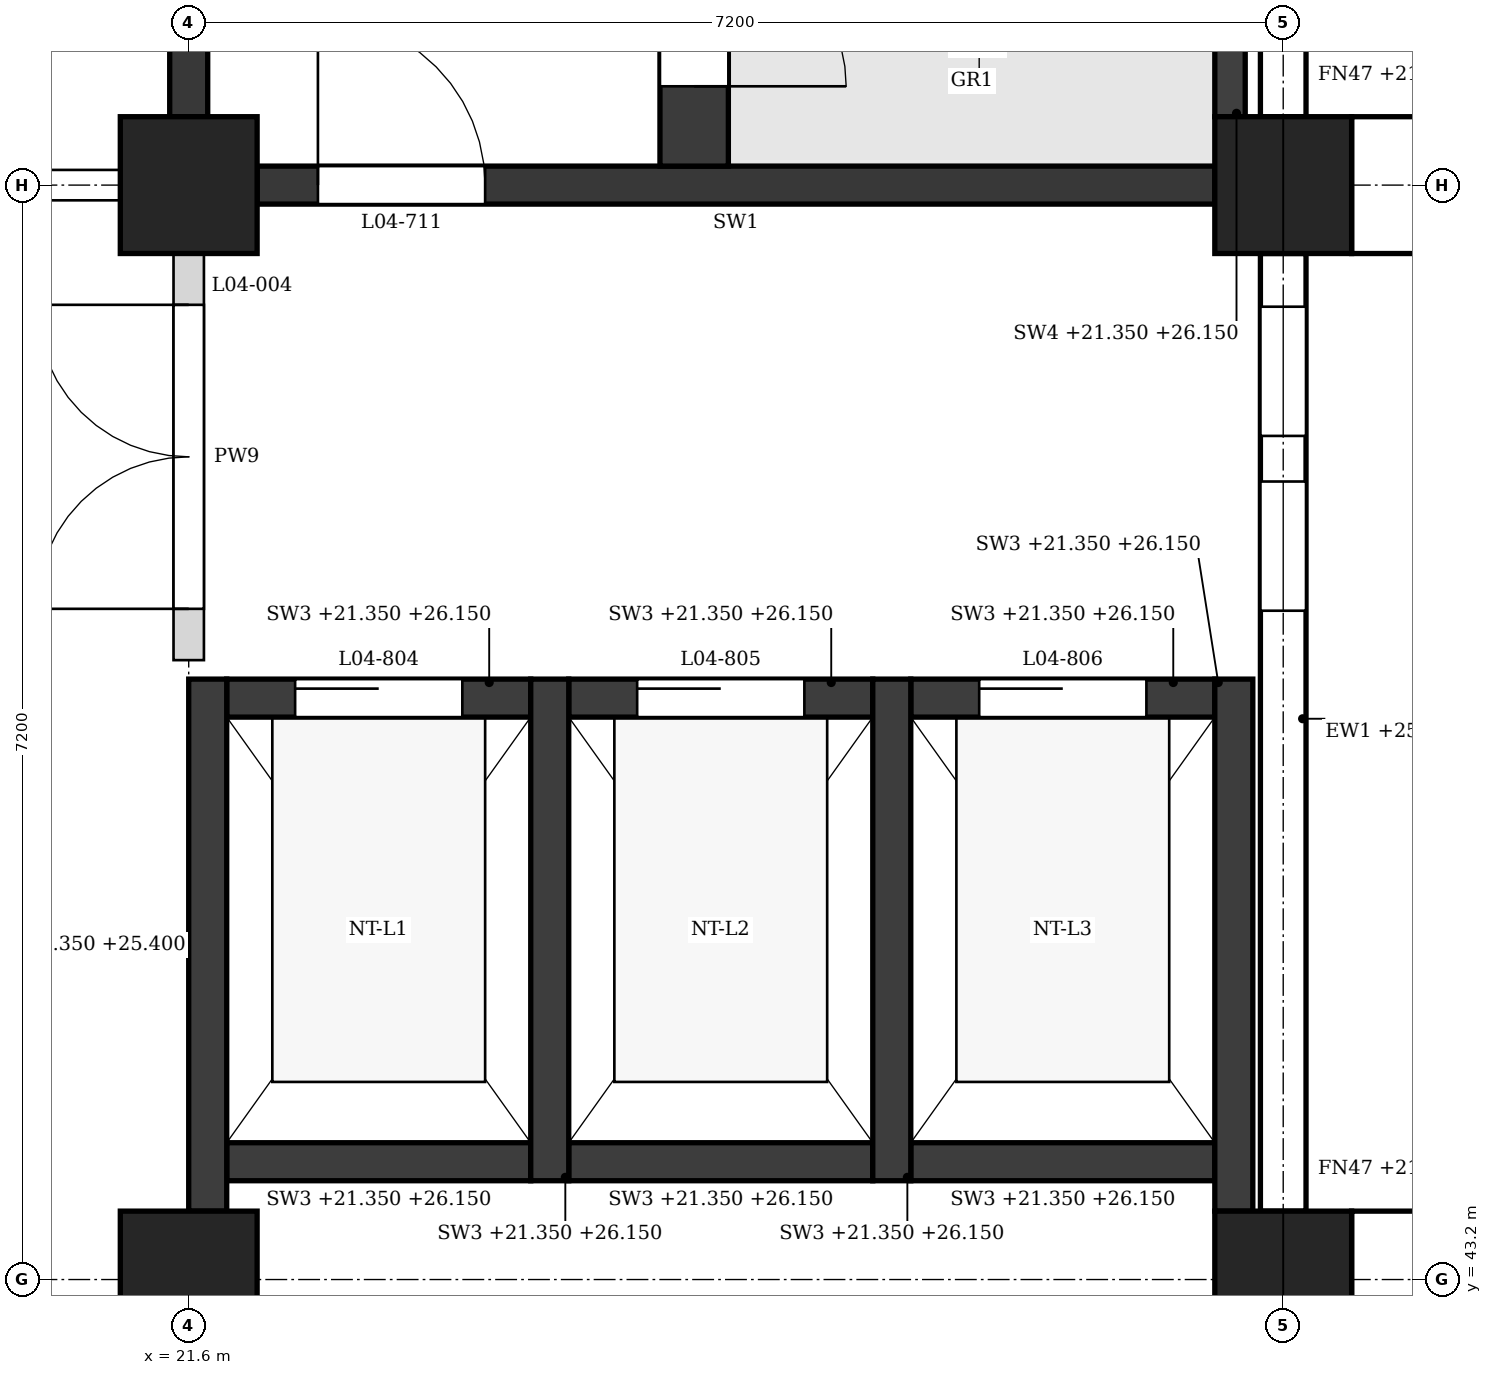
"""IFC4 building model, lengths in metres.
Left out: names, types, materials, properties, quantities, classifications, styles, units other than length and angle.
Written with IfcOpenShell. Run it as: python <this file> out.ifc"""

import sys

from ifc_helpers import new_model, si_unit, direction, frame, frame_2d, origin, origin_2d, place, context, subcontext, project, spatial, polyline, rectangle, outline, extrude, element, fill, save


model = new_model("IFC4")
c1 = context("Model", 3, precision=1e-05, world=origin(), true_north=direction((0.0, 1.0)))
c2 = subcontext(c1, "Body", "Model", "MODEL_VIEW")
j1 = project(units=[si_unit("LENGTHUNIT", "METRE"), si_unit("PLANEANGLEUNIT", "RADIAN")], contexts=[c1])
p1 = place(None, origin())
s1 = spatial("IfcSite", under=j1, at=p1, CompositionType="ELEMENT")
p2 = place(p1, origin())
s2 = spatial("IfcBuilding", under=s1, at=p2, CompositionType="ELEMENT")
p3 = place(p2, frame((0.0, 0.0, 21.6)))
s3 = spatial("IfcBuildingStorey", under=s2, at=p3, CompositionType="ELEMENT", Elevation=21.6)
for number, where, z_axis, x_axis in (
    (1, (21.6, 43.2, 0.0), (0.0, 0.0, 1.0), (1.0, 0.0, 0.0)),
    (2, (21.6, 50.4, 0.0), (0.0, 0.0, 1.0), (1.0, 0.0, 0.0)),
    (3, (28.8, 43.2, 0.0), (0.0, 0.0, 1.0), (1.0, 0.0, 0.0)),
    (4, (28.8, 50.4, 0.0), (0.0, 0.0, 1.0), (1.0, 0.0, 0.0)),
):
    element("IfcColumn", number, at=place(p3, frame(where, z_axis=z_axis, x_axis=x_axis)), inside=s3, PredefinedType="COLUMN", context=c2, shape_type="SweptSolid", body=[
        extrude(rectangle(XDim=0.9, YDim=0.9, at=origin_2d()), origin(), (0.0, 0.0, 1.0), 4.8),
    ])
p4 = place(p3, frame((28.8, 43.65, 0.0), z_axis=(0.0, 0.0, 1.0), x_axis=(0.0, 1.0, 0.0)))
e5 = element("IfcWall", 5, at=p4, inside=s3, PredefinedType="STANDARD", context=c2, shape_type="SweptSolid", body=[
    extrude(rectangle(XDim=6.3, YDim=0.3, at=frame_2d((3.15, 0.0))), origin(), (0.0, 0.0, 1.0), 3.95),
])
p5 = place(p4, frame((3.95, 0.0, 0.9)))
e6 = element("IfcOpeningElement", 6, at=p5, cuts=e5, PredefinedType="OPENING", context=c2, shape_type="SweptSolid", body=[
    extrude(outline(polyline([(0.0, 0.0), (0.85, 0.0), (0.85, 2.05), (0.425, 2.5), (0.0, 2.05), (0.0, 0.0)])), frame((0.0, 0.16, 0.0), z_axis=(0.0, -1.0, 0.0), x_axis=(1.0, 0.0, 0.0)), (0.0, 0.0, 1.0), 0.32),
])
p6 = place(p4, frame((5.1, 0.0, 0.9)))
e7 = element("IfcOpeningElement", 7, at=p6, cuts=e5, PredefinedType="OPENING", context=c2, shape_type="SweptSolid", body=[
    extrude(outline(polyline([(0.0, 0.0), (0.85, 0.0), (0.85, 2.05), (0.425, 2.5), (0.0, 2.05), (0.0, 0.0)])), frame((0.0, 0.16, 0.0), z_axis=(0.0, -1.0, 0.0), x_axis=(1.0, 0.0, 0.0)), (0.0, 0.0, 1.0), 0.32),
])
p7 = place(p3, frame((28.8, 50.85, 0.0), z_axis=(0.0, 0.0, 1.0), x_axis=(0.0, 1.0, 0.0)))
e8 = element("IfcWall", 8, at=p7, inside=s3, PredefinedType="STANDARD", context=c2, shape_type="SweptSolid", body=[
    extrude(rectangle(XDim=6.3, YDim=0.3, at=frame_2d((3.15, 0.0))), origin(), (0.0, 0.0, 1.0), 3.95),
])
p8 = place(p7, frame((0.9, 0.0, 0.9)))
e9 = element("IfcOpeningElement", 9, at=p8, cuts=e8, PredefinedType="OPENING", context=c2, shape_type="SweptSolid", body=[
    extrude(outline(polyline([(0.0, 0.0), (0.9, 0.0), (0.9, 2.05), (0.45, 2.5), (0.0, 2.05), (0.0, 0.0)])), frame((0.0, 0.16, 0.0), z_axis=(0.0, -1.0, 0.0), x_axis=(1.0, 0.0, 0.0)), (0.0, 0.0, 1.0), 0.32),
])
p9 = place(p7, frame((4.5, 0.0, 0.9)))
e10 = element("IfcOpeningElement", 10, at=p9, cuts=e8, PredefinedType="OPENING", context=c2, shape_type="SweptSolid", body=[
    extrude(outline(polyline([(0.0, 0.0), (0.9, 0.0), (0.9, 2.05), (0.45, 2.5), (0.0, 2.05), (0.0, 0.0)])), frame((0.0, 0.16, 0.0), z_axis=(0.0, -1.0, 0.0), x_axis=(1.0, 0.0, 0.0)), (0.0, 0.0, 1.0), 0.32),
])
for number, where, z_axis, x_axis in (
    (11, (29.25, 43.2, -0.25), (0.0, 0.0, 1.0), (1.0, 0.0, 0.0)),
    (12, (29.25, 50.4, -0.25), (0.0, 0.0, 1.0), (1.0, 0.0, 0.0)),
):
    element("IfcWall", number, at=place(p3, frame(where, z_axis=z_axis, x_axis=x_axis)), inside=s3, PredefinedType="POLYGONAL", context=c2, shape_type="SweptSolid", body=[
        extrude(outline(polyline([(1.1, 0.0), (1.1, 19.2), (0.0, 19.2), (0.0, 0.0), (1.1, 0.0)])), frame((0.0, 0.45, 0.0), z_axis=(0.0, -1.0, 0.0), x_axis=(1.0, 0.0, 0.0)), (0.0, 0.0, 1.0), 0.9),
    ])
p10 = place(p3, frame((22.05, 50.4, 0.0), z_axis=(0.0, 0.0, 1.0), x_axis=(1.0, 0.0, 0.0)))
e13 = element("IfcWall", 13, at=p10, inside=s3, PredefinedType="SHEAR", context=c2, shape_type="SweptSolid", body=[
    extrude(rectangle(XDim=6.3, YDim=0.25, at=frame_2d((3.15, 0.0))), origin(), (0.0, 0.0, 1.0), 3.8),
])
p11 = place(p10, frame((0.4, 0.0, 0.0)))
e14 = element("IfcOpeningElement", 14, at=p11, cuts=e13, PredefinedType="OPENING", context=c2, shape_type="SweptSolid", body=[
    extrude(rectangle(XDim=1.1, YDim=2.1, at=frame_2d((0.55, 1.05))), frame((0.0, 0.135, 0.0), z_axis=(0.0, -1.0, 0.0), x_axis=(1.0, 0.0, 0.0)), (0.0, 0.0, 1.0), 0.27),
])
p12 = place(p3, frame((21.6, 50.85, 0.0), z_axis=(0.0, 0.0, 1.0), x_axis=(0.0, 1.0, 0.0)))
e15 = element("IfcWall", 15, at=p12, inside=s3, PredefinedType="SHEAR", context=c2, shape_type="SweptSolid", body=[
    extrude(rectangle(XDim=6.3, YDim=0.25, at=frame_2d((3.15, 0.0))), origin(), (0.0, 0.0, 1.0), 3.8),
])
p13 = place(p3, frame((28.45, 50.85, -0.25), z_axis=(0.0, 0.0, 1.0), x_axis=(0.0, 1.0, 0.0)))
e16 = element("IfcWall", 16, at=p13, inside=s3, PredefinedType="SHEAR", context=c2, shape_type="SweptSolid", body=[
    extrude(rectangle(XDim=0.9, YDim=0.2, at=frame_2d((0.45, 0.0))), origin(), (0.0, 0.0, 1.0), 4.8),
])
p14 = place(p3, frame((24.925, 50.525, 0.0), z_axis=(0.0, 0.0, 1.0), x_axis=(0.0, 1.0, 0.0)))
e17 = element("IfcWall", 17, at=p14, inside=s3, PredefinedType="SHEAR", context=c2, shape_type="SweptSolid", body=[
    extrude(rectangle(XDim=6.85, YDim=0.45, at=frame_2d((3.425, 0.0))), origin(), (0.0, 0.0, 1.0), 4.55),
])
p15 = place(p14, frame((0.525, 0.0, 0.0)))
e18 = element("IfcOpeningElement", 18, at=p15, cuts=e17, PredefinedType="OPENING", context=c2, shape_type="SweptSolid", body=[
    extrude(rectangle(XDim=1.0, YDim=2.1, at=frame_2d((0.5, 1.05))), frame((0.0, 0.235, 0.0), z_axis=(0.0, -1.0, 0.0), x_axis=(1.0, 0.0, 0.0)), (0.0, 0.0, 1.0), 0.47),
])
p16 = place(p3, frame((21.725, 43.65, -0.25), z_axis=(0.0, 0.0, 1.0), x_axis=(0.0, 1.0, 0.0)))
e19 = element("IfcWall", 19, at=p16, inside=s3, PredefinedType="SHEAR", context=c2, shape_type="SweptSolid", body=[
    extrude(rectangle(XDim=3.5, YDim=0.25, at=frame_2d((1.75, 0.0))), origin(), (0.0, 0.0, 1.0), 4.05),
])
for number, where, z_axis, x_axis in (
    (20, (23.975, 43.85, -0.25), (0.0, 0.0, 1.0), (0.0, 1.0, 0.0)),
    (21, (26.225, 43.85, -0.25), (0.0, 0.0, 1.0), (0.0, 1.0, 0.0)),
):
    element("IfcWall", number, at=place(p3, frame(where, z_axis=z_axis, x_axis=x_axis)), inside=s3, PredefinedType="SHEAR", context=c2, shape_type="SweptSolid", body=[
        extrude(rectangle(XDim=3.3, YDim=0.25, at=frame_2d((1.65, 0.0))), origin(), (0.0, 0.0, 1.0), 4.8),
    ])
p17 = place(p3, frame((28.475, 43.65, -0.25), z_axis=(0.0, 0.0, 1.0), x_axis=(0.0, 1.0, 0.0)))
e22 = element("IfcWall", 22, at=p17, inside=s3, PredefinedType="SHEAR", context=c2, shape_type="SweptSolid", body=[
    extrude(rectangle(XDim=3.5, YDim=0.25, at=frame_2d((1.75, 0.0))), origin(), (0.0, 0.0, 1.0), 4.8),
])
p18 = place(p3, frame((21.85, 47.025, -0.25), z_axis=(0.0, 0.0, 1.0), x_axis=(1.0, 0.0, 0.0)))
e23 = element("IfcWall", 23, at=p18, inside=s3, PredefinedType="SHEAR", context=c2, shape_type="SweptSolid", body=[
    extrude(rectangle(XDim=2.0, YDim=0.25, at=frame_2d((1.0, 0.0))), origin(), (0.0, 0.0, 1.0), 4.8),
])
p19 = place(p18, frame((0.45, 0.0, 0.25)))
e24 = element("IfcOpeningElement", 24, at=p19, cuts=e23, PredefinedType="OPENING", context=c2, shape_type="SweptSolid", body=[
    extrude(rectangle(XDim=1.1, YDim=2.1, at=frame_2d((0.55, 1.05))), frame((0.0, 0.135, 0.0), z_axis=(0.0, -1.0, 0.0), x_axis=(1.0, 0.0, 0.0)), (0.0, 0.0, 1.0), 0.27),
])
p20 = place(p3, frame((21.85, 43.975, -0.25), z_axis=(0.0, 0.0, 1.0), x_axis=(1.0, 0.0, 0.0)))
e25 = element("IfcWall", 25, at=p20, inside=s3, PredefinedType="SHEAR", context=c2, shape_type="SweptSolid", body=[
    extrude(rectangle(XDim=2.0, YDim=0.25, at=frame_2d((1.0, 0.0))), origin(), (0.0, 0.0, 1.0), 4.8),
])
p21 = place(p3, frame((24.1, 47.025, -0.25), z_axis=(0.0, 0.0, 1.0), x_axis=(1.0, 0.0, 0.0)))
e26 = element("IfcWall", 26, at=p21, inside=s3, PredefinedType="SHEAR", context=c2, shape_type="SweptSolid", body=[
    extrude(rectangle(XDim=2.0, YDim=0.25, at=frame_2d((1.0, 0.0))), origin(), (0.0, 0.0, 1.0), 4.8),
])
p22 = place(p21, frame((0.45, 0.0, 0.25)))
e27 = element("IfcOpeningElement", 27, at=p22, cuts=e26, PredefinedType="OPENING", context=c2, shape_type="SweptSolid", body=[
    extrude(rectangle(XDim=1.1, YDim=2.1, at=frame_2d((0.55, 1.05))), frame((0.0, 0.135, 0.0), z_axis=(0.0, -1.0, 0.0), x_axis=(1.0, 0.0, 0.0)), (0.0, 0.0, 1.0), 0.27),
])
p23 = place(p3, frame((24.1, 43.975, -0.25), z_axis=(0.0, 0.0, 1.0), x_axis=(1.0, 0.0, 0.0)))
e28 = element("IfcWall", 28, at=p23, inside=s3, PredefinedType="SHEAR", context=c2, shape_type="SweptSolid", body=[
    extrude(rectangle(XDim=2.0, YDim=0.25, at=frame_2d((1.0, 0.0))), origin(), (0.0, 0.0, 1.0), 4.8),
])
p24 = place(p3, frame((26.35, 47.025, -0.25), z_axis=(0.0, 0.0, 1.0), x_axis=(1.0, 0.0, 0.0)))
e29 = element("IfcWall", 29, at=p24, inside=s3, PredefinedType="SHEAR", context=c2, shape_type="SweptSolid", body=[
    extrude(rectangle(XDim=2.0, YDim=0.25, at=frame_2d((1.0, 0.0))), origin(), (0.0, 0.0, 1.0), 4.8),
])
p25 = place(p24, frame((0.45, 0.0, 0.25)))
e30 = element("IfcOpeningElement", 30, at=p25, cuts=e29, PredefinedType="OPENING", context=c2, shape_type="SweptSolid", body=[
    extrude(rectangle(XDim=1.1, YDim=2.1, at=frame_2d((0.55, 1.05))), frame((0.0, 0.135, 0.0), z_axis=(0.0, -1.0, 0.0), x_axis=(1.0, 0.0, 0.0)), (0.0, 0.0, 1.0), 0.27),
])
p26 = place(p3, frame((26.35, 43.975, -0.25), z_axis=(0.0, 0.0, 1.0), x_axis=(1.0, 0.0, 0.0)))
e31 = element("IfcWall", 31, at=p26, inside=s3, PredefinedType="SHEAR", context=c2, shape_type="SweptSolid", body=[
    extrude(rectangle(XDim=2.0, YDim=0.25, at=frame_2d((1.0, 0.0))), origin(), (0.0, 0.0, 1.0), 4.8),
])
p27 = place(p3, frame((14.85, 50.4, 0.0), z_axis=(0.0, 0.0, 1.0), x_axis=(1.0, 0.0, 0.0)))
e32 = element("IfcWall", 32, at=p27, inside=s3, PredefinedType="PARTITIONING", context=c2, shape_type="SweptSolid", body=[
    extrude(rectangle(XDim=6.3, YDim=0.2, at=frame_2d((3.15, 0.0))), origin(), (0.0, 0.0, 1.0), 3.8),
])
p28 = place(p27, frame((4.225, 0.0, 0.0)))
e33 = element("IfcOpeningElement", 33, at=p28, cuts=e32, PredefinedType="OPENING", context=c2, shape_type="SweptSolid", body=[
    extrude(rectangle(XDim=1.0, YDim=2.1, at=frame_2d((0.5, 1.05))), frame((0.0, 0.11, 0.0), z_axis=(0.0, -1.0, 0.0), x_axis=(1.0, 0.0, 0.0)), (0.0, 0.0, 1.0), 0.22),
])
p29 = place(p3, frame((21.6, 47.275, 0.0), z_axis=(0.0, 0.0, 1.0), x_axis=(0.0, 1.0, 0.0)))
e34 = element("IfcWall", 34, at=p29, inside=s3, PredefinedType="PARTITIONING", context=c2, shape_type="SweptSolid", body=[
    extrude(rectangle(XDim=2.675, YDim=0.2, at=frame_2d((1.337, 0.0))), origin(), (0.0, 0.0, 1.0), 3.8),
])
p30 = place(p29, frame((0.337, 0.0, 0.0)))
e35 = element("IfcOpeningElement", 35, at=p30, cuts=e34, PredefinedType="OPENING", context=c2, shape_type="SweptSolid", body=[
    extrude(rectangle(XDim=2.0, YDim=2.4, at=frame_2d((1.0, 1.2))), frame((0.0, 0.11, 0.0), z_axis=(0.0, -1.0, 0.0), x_axis=(1.0, 0.0, 0.0)), (0.0, 0.0, 1.0), 0.22),
])
p31 = place(p5, origin())
e36 = element("IfcWindow", 36, at=p31, inside=s3, PartitioningType="SINGLE_PANEL", PredefinedType="WINDOW", context=c2, shape_type="SweptSolid", body=[
    extrude(outline(polyline([(0.0, 0.0), (0.85, 0.0), (0.85, 2.05), (0.425, 2.5), (0.0, 2.05), (0.0, 0.0)])), frame((0.0, 0.03, 0.0), z_axis=(0.0, -1.0, 0.0), x_axis=(1.0, 0.0, 0.0)), (0.0, 0.0, 1.0), 0.06),
])
fill(e6, e36)
p32 = place(p6, origin())
e37 = element("IfcWindow", 37, at=p32, inside=s3, PartitioningType="SINGLE_PANEL", PredefinedType="WINDOW", context=c2, shape_type="SweptSolid", body=[
    extrude(outline(polyline([(0.0, 0.0), (0.85, 0.0), (0.85, 2.05), (0.425, 2.5), (0.0, 2.05), (0.0, 0.0)])), frame((0.0, 0.03, 0.0), z_axis=(0.0, -1.0, 0.0), x_axis=(1.0, 0.0, 0.0)), (0.0, 0.0, 1.0), 0.06),
])
fill(e7, e37)
p33 = place(p15, frame((1.0, 0.0, 0.0), z_axis=(0.0, 0.0, 1.0), x_axis=(-1.0, 0.0, 0.0)))
e38 = element("IfcDoor", 38, at=p33, inside=s3, OperationType="SINGLE_SWING_RIGHT", PredefinedType="DOOR", context=c2, shape_type="SweptSolid", body=[
    extrude(rectangle(XDim=1.0, YDim=2.1, at=frame_2d((0.5, 1.05))), frame((0.0, 0.025, 0.0), z_axis=(0.0, -1.0, 0.0), x_axis=(1.0, 0.0, 0.0)), (0.0, 0.0, 1.0), 0.05),
])
fill(e18, e38)
p34 = place(p11, origin())
e39 = element("IfcDoor", 39, at=p34, inside=s3, OperationType="SINGLE_SWING_LEFT", PredefinedType="DOOR", context=c2, shape_type="SweptSolid", body=[
    extrude(rectangle(XDim=1.1, YDim=2.1, at=frame_2d((0.55, 1.05))), frame((0.0, 0.025, 0.0), z_axis=(0.0, -1.0, 0.0), x_axis=(1.0, 0.0, 0.0)), (0.0, 0.0, 1.0), 0.05),
])
fill(e14, e39)
p35 = place(p19, origin())
e40 = element("IfcDoor", 40, at=p35, inside=s3, OperationType="SLIDING_TO_LEFT", PredefinedType="DOOR", context=c2, shape_type="SweptSolid", body=[
    extrude(rectangle(XDim=1.1, YDim=2.1, at=frame_2d((0.55, 1.05))), frame((0.0, 0.025, 0.0), z_axis=(0.0, -1.0, 0.0), x_axis=(1.0, 0.0, 0.0)), (0.0, 0.0, 1.0), 0.05),
])
fill(e24, e40)
p36 = place(p22, origin())
e41 = element("IfcDoor", 41, at=p36, inside=s3, OperationType="SLIDING_TO_LEFT", PredefinedType="DOOR", context=c2, shape_type="SweptSolid", body=[
    extrude(rectangle(XDim=1.1, YDim=2.1, at=frame_2d((0.55, 1.05))), frame((0.0, 0.025, 0.0), z_axis=(0.0, -1.0, 0.0), x_axis=(1.0, 0.0, 0.0)), (0.0, 0.0, 1.0), 0.05),
])
fill(e27, e41)
p37 = place(p25, origin())
e42 = element("IfcDoor", 42, at=p37, inside=s3, OperationType="SLIDING_TO_LEFT", PredefinedType="DOOR", context=c2, shape_type="SweptSolid", body=[
    extrude(rectangle(XDim=1.1, YDim=2.1, at=frame_2d((0.55, 1.05))), frame((0.0, 0.025, 0.0), z_axis=(0.0, -1.0, 0.0), x_axis=(1.0, 0.0, 0.0)), (0.0, 0.0, 1.0), 0.05),
])
fill(e30, e42)
p38 = place(p30, origin())
e43 = element("IfcDoor", 43, at=p38, inside=s3, OperationType="DOUBLE_DOOR_SINGLE_SWING", PredefinedType="DOOR", context=c2, shape_type="SweptSolid", body=[
    extrude(rectangle(XDim=2.0, YDim=2.4, at=frame_2d((1.0, 1.2))), frame((0.0, 0.025, 0.0), z_axis=(0.0, -1.0, 0.0), x_axis=(1.0, 0.0, 0.0)), (0.0, 0.0, 1.0), 0.05),
])
fill(e35, e43)
save(model, sys.argv[1])
